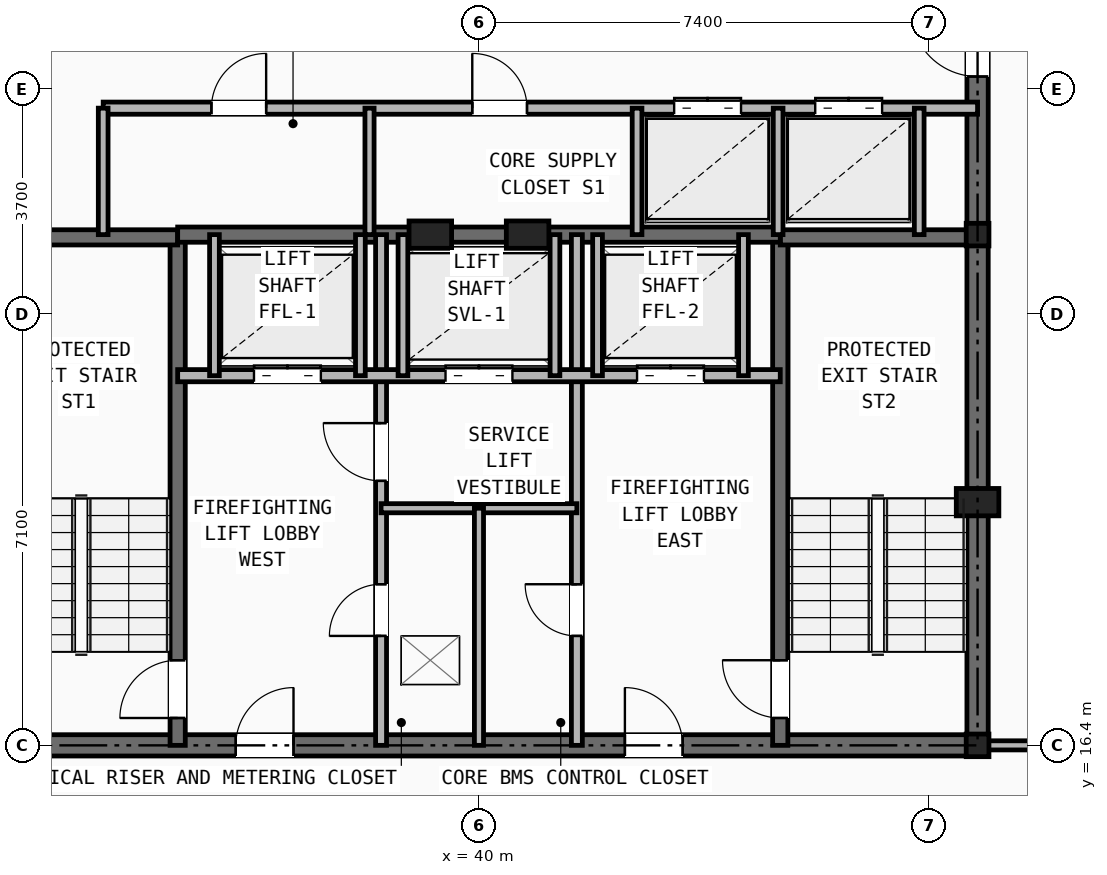
"""IFC4 building model, lengths in metres.
Left out: names, types, materials, properties, quantities, classifications, styles, units other than length and angle.
Written with IfcOpenShell. Run it as: python <this file> out.ifc"""

import sys

from ifc_helpers import new_model, si_unit, direction, frame, frame_2d, origin, origin_2d, place, context, subcontext, project, spatial, rectangle, i_section, extrude, element, fill, save


model = new_model("IFC4")
c1 = context("Model", 3, precision=1e-05, world=origin(), true_north=direction((0.0, 1.0)))
c2 = subcontext(c1, "Body", "Model", "MODEL_VIEW")
j1 = project(units=[si_unit("LENGTHUNIT", "METRE"), si_unit("PLANEANGLEUNIT", "RADIAN")], contexts=[c1])
p1 = place(None, origin())
s1 = spatial("IfcSite", under=j1, at=p1, CompositionType="ELEMENT")
p2 = place(p1, origin())
s2 = spatial("IfcBuilding", under=s1, at=p2, CompositionType="ELEMENT")
p3 = place(p2, frame((0.0, 0.0, 269.0)))
s3 = spatial("IfcBuildingStorey", under=s2, at=p3, CompositionType="ELEMENT", Elevation=269.0)
for number, where, z_axis, x_axis in (
    (1, (48.2, 16.4, 0.0), (0.0, 0.0, 1.0), (1.0, 0.0, 0.0)),
    (2, (48.2, 24.8, 0.0), (0.0, 0.0, 1.0), (1.0, 0.0, 0.0)),
):
    element("IfcColumn", number, at=place(p3, frame(where, z_axis=z_axis, x_axis=x_axis)), inside=s3, PredefinedType="COLUMN", context=c2, shape_type="SweptSolid", body=[
        extrude(i_section(OverallWidth=0.374, OverallDepth=0.372, WebThickness=0.016, FlangeThickness=0.026, at=origin_2d()), origin(), (0.0, 0.0, 1.0), 3.5),
    ])
for number, where, z_axis, x_axis in (
    (3, (48.2, 20.4, 0.0), (0.0, 0.0, 1.0), (1.0, 0.0, 0.0)),
    (4, (39.2, 24.8, 0.0), (0.0, 0.0, 1.0), (1.0, 0.0, 0.0)),
    (5, (40.8, 24.8, 0.0), (0.0, 0.0, 1.0), (1.0, 0.0, 0.0)),
):
    element("IfcColumn", number, at=place(p3, frame(where, z_axis=z_axis, x_axis=x_axis)), inside=s3, PredefinedType="PILASTER", context=c2, shape_type="SweptSolid", body=[
        extrude(rectangle(XDim=0.7, YDim=0.45, at=origin_2d()), origin(), (0.0, 0.0, 1.0), 3.5),
    ])
p4 = place(p3, frame((31.8, 16.4, 0.0), z_axis=(0.0, 0.0, 1.0), x_axis=(1.0, 0.0, 0.0)))
e6 = element("IfcWall", 6, at=p4, inside=s3, PredefinedType="SHEAR", context=c2, shape_type="SweptSolid", body=[
    extrude(rectangle(XDim=16.4, YDim=0.35, at=frame_2d((8.2, 0.0))), origin(), (0.0, 0.0, 1.0), 3.25),
])
p5 = place(p4, frame((4.2, 0.0, 0.0)))
e7 = element("IfcOpeningElement", 7, at=p5, cuts=e6, PredefinedType="OPENING", context=c2, shape_type="SweptSolid", body=[
    extrude(rectangle(XDim=0.95, YDim=2.1, at=frame_2d((0.475, 1.05))), frame((0.0, 0.185, 0.0), z_axis=(0.0, -1.0, 0.0), x_axis=(1.0, 0.0, 0.0)), (0.0, 0.0, 1.0), 0.37),
])
p6 = place(p4, frame((10.6, 0.0, 0.0)))
e8 = element("IfcOpeningElement", 8, at=p6, cuts=e6, PredefinedType="OPENING", context=c2, shape_type="SweptSolid", body=[
    extrude(rectangle(XDim=0.95, YDim=2.1, at=frame_2d((0.475, 1.05))), frame((0.0, 0.185, 0.0), z_axis=(0.0, -1.0, 0.0), x_axis=(1.0, 0.0, 0.0)), (0.0, 0.0, 1.0), 0.37),
])
p7 = place(p3, frame((48.2, 16.4, 0.0), z_axis=(0.0, 0.0, 1.0), x_axis=(0.0, 1.0, 0.0)))
e9 = element("IfcWall", 9, at=p7, inside=s3, PredefinedType="SHEAR", context=c2, shape_type="SweptSolid", body=[
    extrude(rectangle(XDim=14.8, YDim=0.35, at=frame_2d((7.4, 0.0))), origin(), (0.0, 0.0, 1.0), 3.25),
])
p8 = place(p7, frame((11.0, 0.0, 0.0)))
e10 = element("IfcOpeningElement", 10, at=p8, cuts=e9, PredefinedType="OPENING", context=c2, shape_type="SweptSolid", body=[
    extrude(rectangle(XDim=1.1, YDim=2.15, at=frame_2d((0.55, 1.075))), frame((0.0, 0.185, 0.0), z_axis=(0.0, -1.0, 0.0), x_axis=(1.0, 0.0, 0.0)), (0.0, 0.0, 1.0), 0.37),
])
p9 = place(p3, frame((35.045, 16.4, 0.0), z_axis=(0.0, 0.0, 1.0), x_axis=(0.0, 1.0, 0.0)))
e11 = element("IfcWall", 11, at=p9, inside=s3, PredefinedType="SHEAR", context=c2, shape_type="SweptSolid", body=[
    extrude(rectangle(XDim=8.4, YDim=0.25, at=frame_2d((4.2, 0.0))), origin(), (0.0, 0.0, 1.0), 3.25),
])
p10 = place(p9, frame((0.45, 0.0, 0.0)))
e12 = element("IfcOpeningElement", 12, at=p10, cuts=e11, PredefinedType="OPENING", context=c2, shape_type="SweptSolid", body=[
    extrude(rectangle(XDim=0.95, YDim=2.1, at=frame_2d((0.475, 1.05))), frame((0.0, 0.135, 0.0), z_axis=(0.0, -1.0, 0.0), x_axis=(1.0, 0.0, 0.0)), (0.0, 0.0, 1.0), 0.27),
])
p11 = place(p3, frame((31.8, 24.755, 0.0), z_axis=(0.0, 0.0, 1.0), x_axis=(1.0, 0.0, 0.0)))
e13 = element("IfcWall", 13, at=p11, inside=s3, PredefinedType="SHEAR", context=c2, shape_type="SweptSolid", body=[
    extrude(rectangle(XDim=3.245, YDim=0.25, at=frame_2d((1.623, 0.0))), origin(), (0.0, 0.0, 1.0), 3.25),
])
p12 = place(p3, frame((44.955, 16.4, 0.0), z_axis=(0.0, 0.0, 1.0), x_axis=(0.0, 1.0, 0.0)))
e14 = element("IfcWall", 14, at=p12, inside=s3, PredefinedType="SHEAR", context=c2, shape_type="SweptSolid", body=[
    extrude(rectangle(XDim=8.4, YDim=0.25, at=frame_2d((4.2, 0.0))), origin(), (0.0, 0.0, 1.0), 3.25),
])
p13 = place(p12, frame((0.45, 0.0, 0.0)))
e15 = element("IfcOpeningElement", 15, at=p13, cuts=e14, PredefinedType="OPENING", context=c2, shape_type="SweptSolid", body=[
    extrude(rectangle(XDim=0.95, YDim=2.1, at=frame_2d((0.475, 1.05))), frame((0.0, 0.135, 0.0), z_axis=(0.0, -1.0, 0.0), x_axis=(1.0, 0.0, 0.0)), (0.0, 0.0, 1.0), 0.27),
])
p14 = place(p3, frame((44.955, 24.755, 0.0), z_axis=(0.0, 0.0, 1.0), x_axis=(1.0, 0.0, 0.0)))
e16 = element("IfcWall", 16, at=p14, inside=s3, PredefinedType="SHEAR", context=c2, shape_type="SweptSolid", body=[
    extrude(rectangle(XDim=3.245, YDim=0.25, at=frame_2d((1.623, 0.0))), origin(), (0.0, 0.0, 1.0), 3.25),
])
p15 = place(p3, frame((35.045, 24.8, 0.0), z_axis=(0.0, 0.0, 1.0), x_axis=(1.0, 0.0, 0.0)))
e17 = element("IfcWall", 17, at=p15, inside=s3, PredefinedType="SHEAR", context=c2, shape_type="SweptSolid", body=[
    extrude(rectangle(XDim=9.91, YDim=0.25, at=frame_2d((4.955, 0.0))), origin(), (0.0, 0.0, 1.0), 3.25),
])
p16 = place(p3, frame((38.39, 16.4, 0.0), z_axis=(0.0, 0.0, 1.0), x_axis=(0.0, 1.0, 0.0)))
e18 = element("IfcWall", 18, at=p16, inside=s3, PredefinedType="PARTITIONING", context=c2, shape_type="SweptSolid", body=[
    extrude(rectangle(XDim=8.4, YDim=0.18, at=frame_2d((4.2, 0.0))), origin(), (0.0, 0.0, 1.0), 2.705),
])
p17 = place(p16, frame((1.8, 0.0, 0.0)))
e19 = element("IfcOpeningElement", 19, at=p17, cuts=e18, PredefinedType="OPENING", context=c2, shape_type="SweptSolid", body=[
    extrude(rectangle(XDim=0.85, YDim=2.05, at=frame_2d((0.425, 1.025))), frame((0.0, 0.1, 0.0), z_axis=(0.0, -1.0, 0.0), x_axis=(1.0, 0.0, 0.0)), (0.0, 0.0, 1.0), 0.2),
])
p18 = place(p16, frame((4.35, 0.0, 0.0)))
e20 = element("IfcOpeningElement", 20, at=p18, cuts=e18, PredefinedType="OPENING", context=c2, shape_type="SweptSolid", body=[
    extrude(rectangle(XDim=0.95, YDim=2.1, at=frame_2d((0.475, 1.05))), frame((0.0, 0.1, 0.0), z_axis=(0.0, -1.0, 0.0), x_axis=(1.0, 0.0, 0.0)), (0.0, 0.0, 1.0), 0.2),
])
p19 = place(p3, frame((41.61, 16.4, 0.0), z_axis=(0.0, 0.0, 1.0), x_axis=(0.0, 1.0, 0.0)))
e21 = element("IfcWall", 21, at=p19, inside=s3, PredefinedType="PARTITIONING", context=c2, shape_type="SweptSolid", body=[
    extrude(rectangle(XDim=8.4, YDim=0.18, at=frame_2d((4.2, 0.0))), origin(), (0.0, 0.0, 1.0), 2.705),
])
p20 = place(p19, frame((1.8, 0.0, 0.0)))
e22 = element("IfcOpeningElement", 22, at=p20, cuts=e21, PredefinedType="OPENING", context=c2, shape_type="SweptSolid", body=[
    extrude(rectangle(XDim=0.85, YDim=2.05, at=frame_2d((0.425, 1.025))), frame((0.0, 0.1, 0.0), z_axis=(0.0, -1.0, 0.0), x_axis=(1.0, 0.0, 0.0)), (0.0, 0.0, 1.0), 0.2),
])
p21 = place(p3, frame((35.045, 22.48, 0.0), z_axis=(0.0, 0.0, 1.0), x_axis=(1.0, 0.0, 0.0)))
e23 = element("IfcWall", 23, at=p21, inside=s3, PredefinedType="SOLIDWALL", context=c2, shape_type="SweptSolid", body=[
    extrude(rectangle(XDim=9.91, YDim=0.2, at=frame_2d((4.955, 0.0))), origin(), (0.0, 0.0, 1.0), 3.25),
])
p22 = place(p21, frame((1.255, 0.0, 0.0)))
e24 = element("IfcOpeningElement", 24, at=p22, cuts=e23, PredefinedType="OPENING", context=c2, shape_type="SweptSolid", body=[
    extrude(rectangle(XDim=1.1, YDim=2.15, at=frame_2d((0.55, 1.075))), frame((0.0, 0.11, 0.0), z_axis=(0.0, -1.0, 0.0), x_axis=(1.0, 0.0, 0.0)), (0.0, 0.0, 1.0), 0.22),
])
p23 = place(p21, frame((7.555, 0.0, 0.0)))
e25 = element("IfcOpeningElement", 25, at=p23, cuts=e23, PredefinedType="OPENING", context=c2, shape_type="SweptSolid", body=[
    extrude(rectangle(XDim=1.1, YDim=2.15, at=frame_2d((0.55, 1.075))), frame((0.0, 0.11, 0.0), z_axis=(0.0, -1.0, 0.0), x_axis=(1.0, 0.0, 0.0)), (0.0, 0.0, 1.0), 0.22),
])
p24 = place(p21, frame((4.405, 0.0, 0.0)))
e26 = element("IfcOpeningElement", 26, at=p24, cuts=e23, PredefinedType="OPENING", context=c2, shape_type="SweptSolid", body=[
    extrude(rectangle(XDim=1.1, YDim=2.15, at=frame_2d((0.55, 1.075))), frame((0.0, 0.11, 0.0), z_axis=(0.0, -1.0, 0.0), x_axis=(1.0, 0.0, 0.0)), (0.0, 0.0, 1.0), 0.22),
])
p25 = place(p3, frame((38.39, 20.3, 0.0), z_axis=(0.0, 0.0, 1.0), x_axis=(1.0, 0.0, 0.0)))
e27 = element("IfcWall", 27, at=p25, inside=s3, PredefinedType="PARTITIONING", context=c2, shape_type="SweptSolid", body=[
    extrude(rectangle(XDim=3.22, YDim=0.15, at=frame_2d((1.61, 0.0))), origin(), (0.0, 0.0, 1.0), 3.25),
])
p26 = place(p3, frame((40.0, 16.4, 0.0), z_axis=(0.0, 0.0, 1.0), x_axis=(0.0, 1.0, 0.0)))
e28 = element("IfcWall", 28, at=p26, inside=s3, PredefinedType="PARTITIONING", context=c2, shape_type="SweptSolid", body=[
    extrude(rectangle(XDim=3.9, YDim=0.15, at=frame_2d((1.95, 0.0))), origin(), (0.0, 0.0, 1.0), 2.705),
])
for number, where, z_axis, x_axis in (
    (29, (35.65, 22.48, 0.0), (0.0, 0.0, 1.0), (0.0, 1.0, 0.0)),
    (30, (38.05, 22.48, 0.0), (0.0, 0.0, 1.0), (0.0, 1.0, 0.0)),
    (31, (41.95, 22.48, 0.0), (0.0, 0.0, 1.0), (0.0, 1.0, 0.0)),
    (32, (44.35, 22.48, 0.0), (0.0, 0.0, 1.0), (0.0, 1.0, 0.0)),
    (33, (38.75, 22.48, 0.0), (0.0, 0.0, 1.0), (0.0, 1.0, 0.0)),
    (34, (41.25, 22.48, 0.0), (0.0, 0.0, 1.0), (0.0, 1.0, 0.0)),
):
    element("IfcWall", number, at=place(p3, frame(where, z_axis=z_axis, x_axis=x_axis)), inside=s3, PredefinedType="SOLIDWALL", context=c2, shape_type="SweptSolid", body=[
        extrude(rectangle(XDim=2.32, YDim=0.16, at=frame_2d((1.16, 0.0))), origin(), (0.0, 0.0, 1.0), 3.25),
    ])
p27 = place(p3, frame((33.82, 26.88, 0.0), z_axis=(0.0, 0.0, 1.0), x_axis=(1.0, 0.0, 0.0)))
e35 = element("IfcWall", 35, at=p27, inside=s3, PredefinedType="SOLIDWALL", context=c2, shape_type="SweptSolid", body=[
    extrude(rectangle(XDim=14.38, YDim=0.2, at=frame_2d((7.19, 0.0))), origin(), (0.0, 0.0, 1.0), 2.705),
])
p28 = place(p27, frame((1.78, 0.0, 0.0)))
e36 = element("IfcOpeningElement", 36, at=p28, cuts=e35, PredefinedType="OPENING", context=c2, shape_type="SweptSolid", body=[
    extrude(rectangle(XDim=0.9, YDim=2.1, at=frame_2d((0.45, 1.05))), frame((0.0, 0.11, 0.0), z_axis=(0.0, -1.0, 0.0), x_axis=(1.0, 0.0, 0.0)), (0.0, 0.0, 1.0), 0.22),
])
p29 = place(p27, frame((6.07, 0.0, 0.0)))
e37 = element("IfcOpeningElement", 37, at=p29, cuts=e35, PredefinedType="OPENING", context=c2, shape_type="SweptSolid", body=[
    extrude(rectangle(XDim=0.9, YDim=2.1, at=frame_2d((0.45, 1.05))), frame((0.0, 0.11, 0.0), z_axis=(0.0, -1.0, 0.0), x_axis=(1.0, 0.0, 0.0)), (0.0, 0.0, 1.0), 0.22),
])
p30 = place(p27, frame((9.39, 0.0, 0.0)))
e38 = element("IfcOpeningElement", 38, at=p30, cuts=e35, PredefinedType="OPENING", context=c2, shape_type="SweptSolid", body=[
    extrude(rectangle(XDim=1.1, YDim=2.15, at=frame_2d((0.55, 1.075))), frame((0.0, 0.11, 0.0), z_axis=(0.0, -1.0, 0.0), x_axis=(1.0, 0.0, 0.0)), (0.0, 0.0, 1.0), 0.22),
])
p31 = place(p27, frame((11.71, 0.0, 0.0)))
e39 = element("IfcOpeningElement", 39, at=p31, cuts=e35, PredefinedType="OPENING", context=c2, shape_type="SweptSolid", body=[
    extrude(rectangle(XDim=1.1, YDim=2.15, at=frame_2d((0.55, 1.075))), frame((0.0, 0.11, 0.0), z_axis=(0.0, -1.0, 0.0), x_axis=(1.0, 0.0, 0.0)), (0.0, 0.0, 1.0), 0.22),
])
p32 = place(p3, frame((33.82, 24.8, 0.0), z_axis=(0.0, 0.0, 1.0), x_axis=(0.0, 1.0, 0.0)))
e40 = element("IfcWall", 40, at=p32, inside=s3, PredefinedType="SOLIDWALL", context=c2, shape_type="SweptSolid", body=[
    extrude(rectangle(XDim=2.08, YDim=0.16, at=frame_2d((1.04, 0.0))), origin(), (0.0, 0.0, 1.0), 3.25),
])
p33 = place(p3, frame((38.2, 24.8, 0.0), z_axis=(0.0, 0.0, 1.0), x_axis=(0.0, 1.0, 0.0)))
e41 = element("IfcWall", 41, at=p33, inside=s3, PredefinedType="PARTITIONING", context=c2, shape_type="SweptSolid", body=[
    extrude(rectangle(XDim=2.08, YDim=0.15, at=frame_2d((1.04, 0.0))), origin(), (0.0, 0.0, 1.0), 3.25),
])
for number, where, z_axis, x_axis in (
    (42, (42.6, 24.8, 0.0), (0.0, 0.0, 1.0), (0.0, 1.0, 0.0)),
    (43, (44.92, 24.8, 0.0), (0.0, 0.0, 1.0), (0.0, 1.0, 0.0)),
    (44, (47.24, 24.8, 0.0), (0.0, 0.0, 1.0), (0.0, 1.0, 0.0)),
):
    element("IfcWall", number, at=place(p3, frame(where, z_axis=z_axis, x_axis=x_axis)), inside=s3, PredefinedType="SOLIDWALL", context=c2, shape_type="SweptSolid", body=[
        extrude(rectangle(XDim=2.08, YDim=0.16, at=frame_2d((1.04, 0.0))), origin(), (0.0, 0.0, 1.0), 3.25),
    ])
p34 = place(p3, frame((48.2, 16.4, 0.0), z_axis=(0.0, 0.0, 1.0), x_axis=(1.0, 0.0, 0.0)))
e45 = element("IfcWall", 45, at=p34, inside=s3, PredefinedType="PARTITIONING", context=c2, shape_type="SweptSolid", body=[
    extrude(rectangle(XDim=15.135, YDim=0.15, at=frame_2d((7.568, 0.0))), origin(), (0.0, 0.0, 1.0), 2.292),
])
p35 = place(p17, origin())
e46 = element("IfcDoor", 46, at=p35, inside=s3, OperationType="SINGLE_SWING_LEFT", PredefinedType="DOOR", context=c2, shape_type="SweptSolid", body=[
    extrude(rectangle(XDim=0.85, YDim=2.05, at=frame_2d((0.425, 1.025))), frame((0.0, 0.025, 0.0), z_axis=(0.0, -1.0, 0.0), x_axis=(1.0, 0.0, 0.0)), (0.0, 0.0, 1.0), 0.05),
])
fill(e19, e46)
p36 = place(p20, origin())
e47 = element("IfcDoor", 47, at=p36, inside=s3, OperationType="SINGLE_SWING_RIGHT", PredefinedType="DOOR", context=c2, shape_type="SweptSolid", body=[
    extrude(rectangle(XDim=0.85, YDim=2.05, at=frame_2d((0.425, 1.025))), frame((0.0, 0.025, 0.0), z_axis=(0.0, -1.0, 0.0), x_axis=(1.0, 0.0, 0.0)), (0.0, 0.0, 1.0), 0.05),
])
fill(e22, e47)
p37 = place(p18, origin())
e48 = element("IfcDoor", 48, at=p37, inside=s3, OperationType="SINGLE_SWING_RIGHT", PredefinedType="DOOR", context=c2, shape_type="SweptSolid", body=[
    extrude(rectangle(XDim=0.95, YDim=2.1, at=frame_2d((0.475, 1.05))), frame((0.0, 0.025, 0.0), z_axis=(0.0, -1.0, 0.0), x_axis=(1.0, 0.0, 0.0)), (0.0, 0.0, 1.0), 0.05),
])
fill(e20, e48)
p38 = place(p10, origin())
e49 = element("IfcDoor", 49, at=p38, inside=s3, OperationType="SINGLE_SWING_LEFT", PredefinedType="DOOR", context=c2, shape_type="SweptSolid", body=[
    extrude(rectangle(XDim=0.95, YDim=2.1, at=frame_2d((0.475, 1.05))), frame((0.0, 0.025, 0.0), z_axis=(0.0, -1.0, 0.0), x_axis=(1.0, 0.0, 0.0)), (0.0, 0.0, 1.0), 0.05),
])
fill(e12, e49)
p39 = place(p13, origin())
e50 = element("IfcDoor", 50, at=p39, inside=s3, OperationType="SINGLE_SWING_RIGHT", PredefinedType="DOOR", context=c2, shape_type="SweptSolid", body=[
    extrude(rectangle(XDim=0.95, YDim=2.1, at=frame_2d((0.475, 1.05))), frame((0.0, 0.025, 0.0), z_axis=(0.0, -1.0, 0.0), x_axis=(1.0, 0.0, 0.0)), (0.0, 0.0, 1.0), 0.05),
])
fill(e15, e50)
p40 = place(p5, origin())
e51 = element("IfcDoor", 51, at=p40, inside=s3, OperationType="SINGLE_SWING_RIGHT", PredefinedType="DOOR", context=c2, shape_type="SweptSolid", body=[
    extrude(rectangle(XDim=0.95, YDim=2.1, at=frame_2d((0.475, 1.05))), frame((0.0, 0.025, 0.0), z_axis=(0.0, -1.0, 0.0), x_axis=(1.0, 0.0, 0.0)), (0.0, 0.0, 1.0), 0.05),
])
fill(e7, e51)
p41 = place(p6, origin())
e52 = element("IfcDoor", 52, at=p41, inside=s3, OperationType="SINGLE_SWING_LEFT", PredefinedType="DOOR", context=c2, shape_type="SweptSolid", body=[
    extrude(rectangle(XDim=0.95, YDim=2.1, at=frame_2d((0.475, 1.05))), frame((0.0, 0.025, 0.0), z_axis=(0.0, -1.0, 0.0), x_axis=(1.0, 0.0, 0.0)), (0.0, 0.0, 1.0), 0.05),
])
fill(e8, e52)
p42 = place(p22, origin())
e53 = element("IfcDoor", 53, at=p42, inside=s3, OperationType="DOUBLE_DOOR_SLIDING", PredefinedType="DOOR", context=c2, shape_type="SweptSolid", body=[
    extrude(rectangle(XDim=1.1, YDim=2.15, at=frame_2d((0.55, 1.075))), frame((0.0, 0.025, 0.0), z_axis=(0.0, -1.0, 0.0), x_axis=(1.0, 0.0, 0.0)), (0.0, 0.0, 1.0), 0.05),
])
fill(e24, e53)
p43 = place(p23, origin())
e54 = element("IfcDoor", 54, at=p43, inside=s3, OperationType="DOUBLE_DOOR_SLIDING", PredefinedType="DOOR", context=c2, shape_type="SweptSolid", body=[
    extrude(rectangle(XDim=1.1, YDim=2.15, at=frame_2d((0.55, 1.075))), frame((0.0, 0.025, 0.0), z_axis=(0.0, -1.0, 0.0), x_axis=(1.0, 0.0, 0.0)), (0.0, 0.0, 1.0), 0.05),
])
fill(e25, e54)
p44 = place(p24, origin())
e55 = element("IfcDoor", 55, at=p44, inside=s3, OperationType="DOUBLE_DOOR_SLIDING", PredefinedType="DOOR", context=c2, shape_type="SweptSolid", body=[
    extrude(rectangle(XDim=1.1, YDim=2.15, at=frame_2d((0.55, 1.075))), frame((0.0, 0.025, 0.0), z_axis=(0.0, -1.0, 0.0), x_axis=(1.0, 0.0, 0.0)), (0.0, 0.0, 1.0), 0.05),
])
fill(e26, e55)
p45 = place(p8, origin())
e56 = element("IfcDoor", 56, at=p45, inside=s3, OperationType="SINGLE_SWING_RIGHT", PredefinedType="DOOR", context=c2, shape_type="SweptSolid", body=[
    extrude(rectangle(XDim=1.1, YDim=2.15, at=frame_2d((0.55, 1.075))), frame((0.0, 0.025, 0.0), z_axis=(0.0, -1.0, 0.0), x_axis=(1.0, 0.0, 0.0)), (0.0, 0.0, 1.0), 0.05),
])
fill(e10, e56)
p46 = place(p28, origin())
e57 = element("IfcDoor", 57, at=p46, inside=s3, OperationType="SINGLE_SWING_RIGHT", PredefinedType="DOOR", context=c2, shape_type="SweptSolid", body=[
    extrude(rectangle(XDim=0.9, YDim=2.1, at=frame_2d((0.45, 1.05))), frame((0.0, 0.025, 0.0), z_axis=(0.0, -1.0, 0.0), x_axis=(1.0, 0.0, 0.0)), (0.0, 0.0, 1.0), 0.05),
])
fill(e36, e57)
p47 = place(p29, origin())
e58 = element("IfcDoor", 58, at=p47, inside=s3, OperationType="SINGLE_SWING_LEFT", PredefinedType="DOOR", context=c2, shape_type="SweptSolid", body=[
    extrude(rectangle(XDim=0.9, YDim=2.1, at=frame_2d((0.45, 1.05))), frame((0.0, 0.025, 0.0), z_axis=(0.0, -1.0, 0.0), x_axis=(1.0, 0.0, 0.0)), (0.0, 0.0, 1.0), 0.05),
])
fill(e37, e58)
p48 = place(p30, origin())
e59 = element("IfcDoor", 59, at=p48, inside=s3, OperationType="DOUBLE_DOOR_SLIDING", PredefinedType="DOOR", context=c2, shape_type="SweptSolid", body=[
    extrude(rectangle(XDim=1.1, YDim=2.15, at=frame_2d((0.55, 1.075))), frame((0.0, 0.025, 0.0), z_axis=(0.0, -1.0, 0.0), x_axis=(1.0, 0.0, 0.0)), (0.0, 0.0, 1.0), 0.05),
])
fill(e38, e59)
p49 = place(p31, origin())
e60 = element("IfcDoor", 60, at=p49, inside=s3, OperationType="DOUBLE_DOOR_SLIDING", PredefinedType="DOOR", context=c2, shape_type="SweptSolid", body=[
    extrude(rectangle(XDim=1.1, YDim=2.15, at=frame_2d((0.55, 1.075))), frame((0.0, 0.025, 0.0), z_axis=(0.0, -1.0, 0.0), x_axis=(1.0, 0.0, 0.0)), (0.0, 0.0, 1.0), 0.05),
])
fill(e39, e60)
save(model, sys.argv[1])
